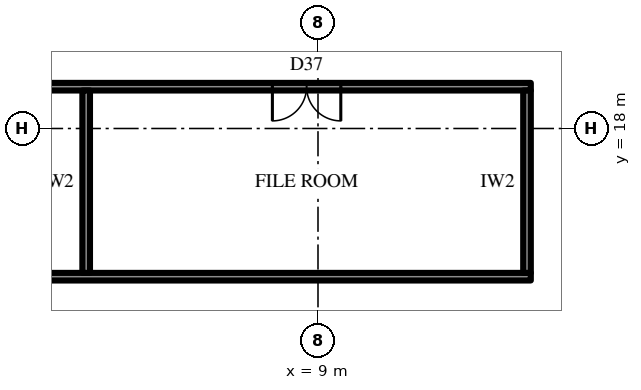
"""IFC4 building model, lengths in metres.
Left out: names, types, materials, properties, quantities, classifications, styles, units other than length and angle.
Written with IfcOpenShell. Run it as: python <this file> out.ifc"""

import sys

from ifc_helpers import new_model, si_unit, direction, frame, frame_2d, origin, place, context, subcontext, project, spatial, rectangle, extrude, element, fill, save


model = new_model("IFC4")
c1 = context("Model", 3, precision=1e-05, world=origin(), true_north=direction((0.0, 1.0)))
c2 = subcontext(c1, "Body", "Model", "MODEL_VIEW")
j1 = project(units=[si_unit("LENGTHUNIT", "METRE"), si_unit("PLANEANGLEUNIT", "RADIAN")], contexts=[c1])
p1 = place(None, origin())
s1 = spatial("IfcSite", under=j1, at=p1, CompositionType="ELEMENT")
p2 = place(p1, origin())
s2 = spatial("IfcBuilding", under=s1, at=p2, CompositionType="ELEMENT")
p3 = place(p2, frame((0.0, 0.0, 219.7)))
s3 = spatial("IfcBuildingStorey", under=s2, at=p3, CompositionType="ELEMENT", Elevation=219.7)
p4 = place(p3, frame((-14.6, 14.1, 0.0), z_axis=(0.0, 0.0, 1.0), x_axis=(1.0, 0.0, 0.0)))
e1 = element("IfcWall", 1, at=p4, inside=s3, PredefinedType="PARTITIONING", context=c2, shape_type="SweptSolid", body=[
    extrude(rectangle(XDim=29.2, YDim=0.2, at=frame_2d((14.6, 0.0))), origin(), (0.0, 0.0, 1.0), 4.0),
])
p5 = place(p3, frame((-14.6, 19.1, 0.0), z_axis=(0.0, 0.0, 1.0), x_axis=(1.0, 0.0, 0.0)))
e2 = element("IfcWall", 2, at=p5, inside=s3, PredefinedType="PARTITIONING", context=c2, shape_type="SweptSolid", body=[
    extrude(rectangle(XDim=29.2, YDim=0.2, at=frame_2d((14.6, 0.0))), origin(), (0.0, 0.0, 1.0), 4.0),
])
p6 = place(p5, frame((7.9, 0.0, 0.0)))
e3 = element("IfcOpeningElement", 3, at=p6, cuts=e2, PredefinedType="OPENING", context=c2, shape_type="SweptSolid", body=[
    extrude(rectangle(XDim=1.8, YDim=2.4, at=frame_2d((0.9, 1.2))), frame((0.0, 0.11, 0.0), z_axis=(0.0, -1.0, 0.0), x_axis=(1.0, 0.0, 0.0)), (0.0, 0.0, 1.0), 0.22),
])
p7 = place(p5, frame((22.4, 0.0, 0.0)))
e4 = element("IfcOpeningElement", 4, at=p7, cuts=e2, PredefinedType="OPENING", context=c2, shape_type="SweptSolid", body=[
    extrude(rectangle(XDim=1.8, YDim=2.4, at=frame_2d((0.9, 1.2))), frame((0.0, 0.11, 0.0), z_axis=(0.0, -1.0, 0.0), x_axis=(1.0, 0.0, 0.0)), (0.0, 0.0, 1.0), 0.22),
])
for number, where, z_axis, x_axis in (
    (5, (2.9, 14.2, 0.0), (0.0, 0.0, 1.0), (0.0, 1.0, 0.0)),
    (6, (14.5, 14.2, 0.0), (0.0, 0.0, 1.0), (0.0, 1.0, 0.0)),
):
    element("IfcWall", number, at=place(p3, frame(where, z_axis=z_axis, x_axis=x_axis)), inside=s3, PredefinedType="PARTITIONING", context=c2, shape_type="SweptSolid", body=[
        extrude(rectangle(XDim=4.8, YDim=0.2, at=frame_2d((2.4, 0.0))), origin(), (0.0, 0.0, 1.0), 4.0),
    ])
p8 = place(p7, frame((1.8, 0.0, 0.0), z_axis=(0.0, 0.0, 1.0), x_axis=(-1.0, 0.0, 0.0)))
e7 = element("IfcDoor", 7, at=p8, inside=s3, OperationType="DOUBLE_DOOR_SINGLE_SWING", PredefinedType="DOOR", context=c2, shape_type="SweptSolid", body=[
    extrude(rectangle(XDim=1.8, YDim=2.4, at=frame_2d((0.9, 1.2))), frame((0.0, 0.025, 0.0), z_axis=(0.0, -1.0, 0.0), x_axis=(1.0, 0.0, 0.0)), (0.0, 0.0, 1.0), 0.05),
])
fill(e4, e7)
save(model, sys.argv[1])
